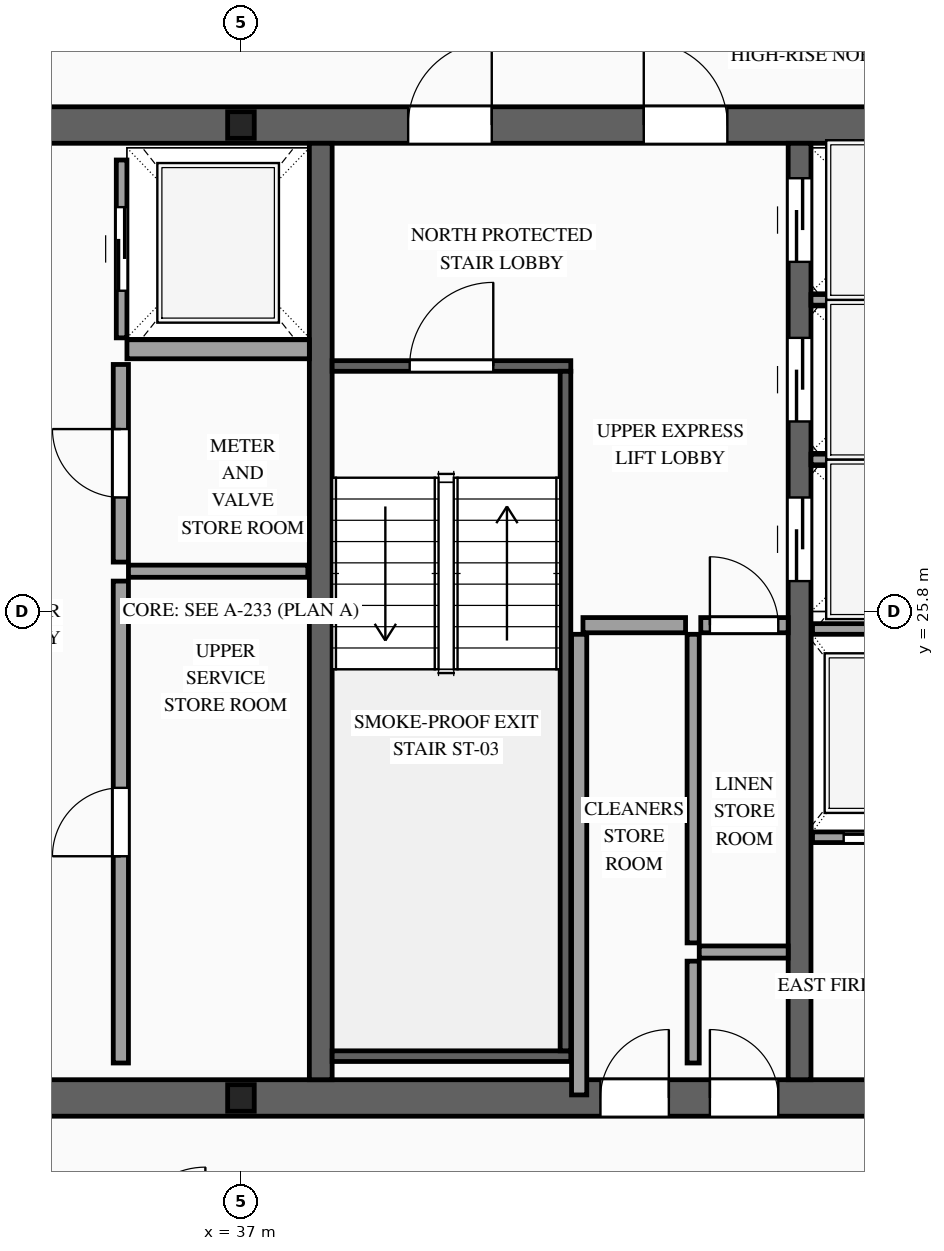
"""IFC4 building model, lengths in metres.
Left out: names, types, materials, properties, quantities, classifications, styles, units other than length and angle.
Written with IfcOpenShell. Run it as: python <this file> out.ifc"""

import sys

from ifc_helpers import new_model, si_unit, direction, frame, frame_2d, origin, origin_2d, place, context, subcontext, project, spatial, rectangle, i_section, extrude, source, transform, mapped, element, fill, save


model = new_model("IFC4")
c1 = context("Model", 3, precision=1e-05, world=origin(), true_north=direction((0.0, 1.0)))
c2 = subcontext(c1, "Body", "Model", "MODEL_VIEW")
j1 = project(units=[si_unit("LENGTHUNIT", "METRE"), si_unit("PLANEANGLEUNIT", "RADIAN")], contexts=[c1])
p1 = place(None, origin())
s1 = spatial("IfcSite", under=j1, at=p1, CompositionType="ELEMENT")
p2 = place(p1, origin())
s2 = spatial("IfcBuilding", under=s1, at=p2, CompositionType="ELEMENT")
p3 = place(p2, frame((0.0, 0.0, 311.2)))
s3 = spatial("IfcBuildingStorey", under=s2, at=p3, CompositionType="ELEMENT", Elevation=311.2)
p4 = place(p3, frame((23.56, 19.4, 0.0), z_axis=(0.0, 0.0, 1.0), x_axis=(1.0, 0.0, 0.0)))
e1 = element("IfcWall", 1, at=p4, inside=s3, PredefinedType="SHEAR", context=c2, shape_type="SweptSolid", body=[
    extrude(rectangle(XDim=26.88, YDim=0.48, at=frame_2d((13.44, 0.0))), origin(), (0.0, 0.0, 1.0), 3.5),
])
p5 = place(p4, frame((1.89, 0.0, 0.0)))
e2 = element("IfcOpeningElement", 2, at=p5, cuts=e1, PredefinedType="OPENING", context=c2, shape_type="SweptSolid", body=[
    extrude(rectangle(XDim=1.1, YDim=2.2, at=frame_2d((0.55, 1.1))), frame((0.0, 0.255, 0.0), z_axis=(0.0, -1.0, 0.0), x_axis=(1.0, 0.0, 0.0)), (0.0, 0.0, 1.0), 0.51),
])
p6 = place(p4, frame((9.79, 0.0, 0.0)))
e3 = element("IfcOpeningElement", 3, at=p6, cuts=e1, PredefinedType="OPENING", context=c2, shape_type="SweptSolid", body=[
    extrude(rectangle(XDim=1.1, YDim=2.2, at=frame_2d((0.55, 1.1))), frame((0.0, 0.255, 0.0), z_axis=(0.0, -1.0, 0.0), x_axis=(1.0, 0.0, 0.0)), (0.0, 0.0, 1.0), 0.51),
])
p7 = place(p4, frame((22.99, 0.0, 0.0)))
e4 = element("IfcOpeningElement", 4, at=p7, cuts=e1, PredefinedType="OPENING", context=c2, shape_type="SweptSolid", body=[
    extrude(rectangle(XDim=1.1, YDim=2.2, at=frame_2d((0.55, 1.1))), frame((0.0, 0.255, 0.0), z_axis=(0.0, -1.0, 0.0), x_axis=(1.0, 0.0, 0.0)), (0.0, 0.0, 1.0), 0.51),
])
p8 = place(p4, frame((19.61, 0.0, 0.0)))
e5 = element("IfcOpeningElement", 5, at=p8, cuts=e1, PredefinedType="OPENING", context=c2, shape_type="SweptSolid", body=[
    extrude(rectangle(XDim=0.9, YDim=2.15, at=frame_2d((0.45, 1.075))), frame((0.0, 0.255, 0.0), z_axis=(0.0, -1.0, 0.0), x_axis=(1.0, 0.0, 0.0)), (0.0, 0.0, 1.0), 0.51),
])
p9 = place(p4, frame((18.17, 0.0, 0.0)))
e6 = element("IfcOpeningElement", 6, at=p9, cuts=e1, PredefinedType="OPENING", context=c2, shape_type="SweptSolid", body=[
    extrude(rectangle(XDim=0.9, YDim=2.15, at=frame_2d((0.45, 1.075))), frame((0.0, 0.255, 0.0), z_axis=(0.0, -1.0, 0.0), x_axis=(1.0, 0.0, 0.0)), (0.0, 0.0, 1.0), 0.51),
])
p10 = place(p3, frame((23.56, 32.2, 0.0), z_axis=(0.0, 0.0, 1.0), x_axis=(1.0, 0.0, 0.0)))
e7 = element("IfcWall", 7, at=p10, inside=s3, PredefinedType="SHEAR", context=c2, shape_type="SweptSolid", body=[
    extrude(rectangle(XDim=26.88, YDim=0.48, at=frame_2d((13.44, 0.0))), origin(), (0.0, 0.0, 1.0), 3.5),
])
p11 = place(p10, frame((4.51, 0.0, 0.0)))
e8 = element("IfcOpeningElement", 8, at=p11, cuts=e7, PredefinedType="OPENING", context=c2, shape_type="SweptSolid", body=[
    extrude(rectangle(XDim=0.9, YDim=2.15, at=frame_2d((0.45, 1.075))), frame((0.0, 0.255, 0.0), z_axis=(0.0, -1.0, 0.0), x_axis=(1.0, 0.0, 0.0)), (0.0, 0.0, 1.0), 0.51),
])
p12 = place(p10, frame((9.79, 0.0, 0.0)))
e9 = element("IfcOpeningElement", 9, at=p12, cuts=e7, PredefinedType="OPENING", context=c2, shape_type="SweptSolid", body=[
    extrude(rectangle(XDim=1.1, YDim=2.2, at=frame_2d((0.55, 1.1))), frame((0.0, 0.255, 0.0), z_axis=(0.0, -1.0, 0.0), x_axis=(1.0, 0.0, 0.0)), (0.0, 0.0, 1.0), 0.51),
])
p13 = place(p10, frame((15.64, 0.0, 0.0)))
e10 = element("IfcOpeningElement", 10, at=p13, cuts=e7, PredefinedType="OPENING", context=c2, shape_type="SweptSolid", body=[
    extrude(rectangle(XDim=1.1, YDim=2.2, at=frame_2d((0.55, 1.1))), frame((0.0, 0.255, 0.0), z_axis=(0.0, -1.0, 0.0), x_axis=(1.0, 0.0, 0.0)), (0.0, 0.0, 1.0), 0.51),
])
p14 = place(p10, frame((18.74, 0.0, 0.0)))
e11 = element("IfcOpeningElement", 11, at=p14, cuts=e7, PredefinedType="OPENING", context=c2, shape_type="SweptSolid", body=[
    extrude(rectangle(XDim=1.1, YDim=2.2, at=frame_2d((0.55, 1.1))), frame((0.0, 0.255, 0.0), z_axis=(0.0, -1.0, 0.0), x_axis=(1.0, 0.0, 0.0)), (0.0, 0.0, 1.0), 0.51),
])
m1 = source(origin(), c2, "Body", "SweptSolid", [
    extrude(rectangle(XDim=12.32, YDim=0.3, at=frame_2d((6.16, 0.0))), origin(), (0.0, 0.0, 1.0), 3.5),
])
p15 = place(p3, frame((38.05, 19.64, 0.0), z_axis=(0.0, 0.0, 1.0), x_axis=(0.0, 1.0, 0.0)))
e12 = element("IfcWall", 12, at=p15, inside=s3, PredefinedType="SOLIDWALL", context=c2, shape_type="MappedRepresentation", body=[
    mapped(m1, transform((0.0, 0.0, 0.0), scale=1.0)),
])
p16 = place(p3, frame((44.35, 19.64, 0.0), z_axis=(0.0, 0.0, 1.0), x_axis=(0.0, 1.0, 0.0)))
e13 = element("IfcWall", 13, at=p16, inside=s3, PredefinedType="SOLIDWALL", context=c2, shape_type="SweptSolid", body=[
    extrude(rectangle(XDim=12.32, YDim=0.3, at=frame_2d((6.16, 0.0))), origin(), (0.0, 0.0, 1.0), 3.5),
])
p17 = place(p16, frame((6.56, 0.0, 0.0)))
e14 = element("IfcOpeningElement", 14, at=p17, cuts=e13, PredefinedType="OPENING", context=c2, shape_type="SweptSolid", body=[
    extrude(rectangle(XDim=1.1, YDim=2.2, at=frame_2d((0.55, 1.1))), frame((0.0, 0.165, 0.0), z_axis=(0.0, -1.0, 0.0), x_axis=(1.0, 0.0, 0.0)), (0.0, 0.0, 1.0), 0.33),
])
p18 = place(p16, frame((8.66, 0.0, 0.0)))
e15 = element("IfcOpeningElement", 15, at=p18, cuts=e13, PredefinedType="OPENING", context=c2, shape_type="SweptSolid", body=[
    extrude(rectangle(XDim=1.1, YDim=2.2, at=frame_2d((0.55, 1.1))), frame((0.0, 0.165, 0.0), z_axis=(0.0, -1.0, 0.0), x_axis=(1.0, 0.0, 0.0)), (0.0, 0.0, 1.0), 0.33),
])
p19 = place(p16, frame((10.76, 0.0, 0.0)))
e16 = element("IfcOpeningElement", 16, at=p19, cuts=e13, PredefinedType="OPENING", context=c2, shape_type="SweptSolid", body=[
    extrude(rectangle(XDim=1.1, YDim=2.2, at=frame_2d((0.55, 1.1))), frame((0.0, 0.165, 0.0), z_axis=(0.0, -1.0, 0.0), x_axis=(1.0, 0.0, 0.0)), (0.0, 0.0, 1.0), 0.33),
])
m2 = source(origin(), c2, "Body", "SweptSolid", [
    extrude(i_section(OverallWidth=0.35, OverallDepth=0.35, WebThickness=0.012, FlangeThickness=0.019, at=origin_2d()), origin(), (0.0, 0.0, 1.0), 3.5),
])
for number, where, z_axis, x_axis in (
    (17, (37.0, 19.4, 0.0), (0.0, 0.0, 1.0), (1.0, 0.0, 0.0)),
    (18, (37.0, 32.2, 0.0), (0.0, 0.0, 1.0), (1.0, 0.0, 0.0)),
):
    element("IfcColumn", number, at=place(p3, frame(where, z_axis=z_axis, x_axis=x_axis)), inside=s3, PredefinedType="COLUMN", context=c2, shape_type="MappedRepresentation", body=[
        mapped(m2, transform((0.0, 0.0, 0.0), scale=1.0)),
    ])
p20 = place(p3, frame((44.52, 22.83, 0.0), z_axis=(0.0, 0.0, 1.0), x_axis=(1.0, 0.0, 0.0)))
e19 = element("IfcWall", 19, at=p20, inside=s3, PredefinedType="SOLIDWALL", context=c2, shape_type="SweptSolid", body=[
    extrude(rectangle(XDim=1.92, YDim=0.14, at=frame_2d((0.96, 0.0))), origin(), (0.0, 0.0, 1.0), 3.28),
])
p21 = place(p20, frame((0.41, 0.0, 0.0)))
e20 = element("IfcOpeningElement", 20, at=p21, cuts=e19, PredefinedType="OPENING", context=c2, shape_type="SweptSolid", body=[
    extrude(rectangle(XDim=1.1, YDim=2.2, at=frame_2d((0.55, 1.1))), frame((0.0, 0.085, 0.0), z_axis=(0.0, -1.0, 0.0), x_axis=(1.0, 0.0, 0.0)), (0.0, 0.0, 1.0), 0.17),
])
m3 = source(origin(), c2, "Body", "SweptSolid", [
    extrude(rectangle(XDim=1.92, YDim=0.14, at=frame_2d((0.96, 0.0))), origin(), (0.0, 0.0, 1.0), 3.28),
])
p22 = place(p3, frame((44.52, 25.57, 0.0), z_axis=(0.0, 0.0, 1.0), x_axis=(1.0, 0.0, 0.0)))
e21 = element("IfcWall", 21, at=p22, inside=s3, PredefinedType="SOLIDWALL", context=c2, shape_type="MappedRepresentation", body=[
    mapped(m3, transform((0.0, 0.0, 0.0), scale=1.0)),
])
p23 = place(p3, frame((35.43, 29.4, 0.0), z_axis=(0.0, 0.0, 1.0), x_axis=(0.0, 1.0, 0.0)))
e22 = element("IfcWall", 22, at=p23, inside=s3, PredefinedType="SOLIDWALL", context=c2, shape_type="SweptSolid", body=[
    extrude(rectangle(XDim=2.34, YDim=0.14, at=frame_2d((1.17, 0.0))), origin(), (0.0, 0.0, 1.0), 3.28),
])
p24 = place(p23, frame((0.62, 0.0, 0.0)))
e23 = element("IfcOpeningElement", 23, at=p24, cuts=e22, PredefinedType="OPENING", context=c2, shape_type="SweptSolid", body=[
    extrude(rectangle(XDim=1.1, YDim=2.2, at=frame_2d((0.55, 1.1))), frame((0.0, 0.085, 0.0), z_axis=(0.0, -1.0, 0.0), x_axis=(1.0, 0.0, 0.0)), (0.0, 0.0, 1.0), 0.17),
])
m4 = source(origin(), c2, "Body", "SweptSolid", [
    extrude(rectangle(XDim=2.4, YDim=0.25, at=frame_2d((1.2, 0.0))), origin(), (0.0, 0.0, 1.0), 3.28),
])
p25 = place(p3, frame((35.5, 29.25, 0.0), z_axis=(0.0, 0.0, 1.0), x_axis=(1.0, 0.0, 0.0)))
e24 = element("IfcWall", 24, at=p25, inside=s3, PredefinedType="SOLIDWALL", context=c2, shape_type="MappedRepresentation", body=[
    mapped(m4, transform((0.0, 0.0, 0.0), scale=1.0)),
])
m5 = source(origin(), c2, "Body", "SweptSolid", [
    extrude(rectangle(XDim=2.0, YDim=0.14, at=frame_2d((1.0, 0.0))), origin(), (0.0, 0.0, 1.0), 3.28),
])
for number, where, z_axis, x_axis in (
    (25, (44.5, 27.8, 0.0), (0.0, 0.0, 1.0), (1.0, 0.0, 0.0)),
    (26, (44.5, 29.9, 0.0), (0.0, 0.0, 1.0), (1.0, 0.0, 0.0)),
):
    element("IfcWall", number, at=place(p3, frame(where, z_axis=z_axis, x_axis=x_axis)), inside=s3, PredefinedType="SOLIDWALL", context=c2, shape_type="MappedRepresentation", body=[
        mapped(m5, transform((0.0, 0.0, 0.0), scale=1.0)),
    ])
p26 = place(p3, frame((38.2, 29.03, 0.0), z_axis=(0.0, 0.0, 1.0), x_axis=(1.0, 0.0, 0.0)))
e27 = element("IfcWall", 27, at=p26, inside=s3, PredefinedType="SOLIDWALL", context=c2, shape_type="SweptSolid", body=[
    extrude(rectangle(XDim=3.14, YDim=0.14, at=frame_2d((1.57, 0.0))), origin(), (0.0, 0.0, 1.0), 3.28),
])
p27 = place(p26, frame((1.02, 0.0, 0.0)))
e28 = element("IfcOpeningElement", 28, at=p27, cuts=e27, PredefinedType="OPENING", context=c2, shape_type="SweptSolid", body=[
    extrude(rectangle(XDim=1.1, YDim=2.2, at=frame_2d((0.55, 1.1))), frame((0.0, 0.085, 0.0), z_axis=(0.0, -1.0, 0.0), x_axis=(1.0, 0.0, 0.0)), (0.0, 0.0, 1.0), 0.17),
])
m6 = source(origin(), c2, "Body", "SweptSolid", [
    extrude(rectangle(XDim=3.14, YDim=0.14, at=frame_2d((1.57, 0.0))), origin(), (0.0, 0.0, 1.0), 3.28),
])
p28 = place(p3, frame((38.2, 19.95, 0.0), z_axis=(0.0, 0.0, 1.0), x_axis=(1.0, 0.0, 0.0)))
e29 = element("IfcWall", 29, at=p28, inside=s3, PredefinedType="SOLIDWALL", context=c2, shape_type="MappedRepresentation", body=[
    mapped(m6, transform((0.0, 0.0, 0.0), scale=1.0)),
])
m7 = source(origin(), c2, "Body", "SweptSolid", [
    extrude(rectangle(XDim=8.94, YDim=0.14, at=frame_2d((4.47, 0.0))), origin(), (0.0, 0.0, 1.0), 3.28),
])
p29 = place(p3, frame((41.27, 20.02, 0.0), z_axis=(0.0, 0.0, 1.0), x_axis=(0.0, 1.0, 0.0)))
e30 = element("IfcWall", 30, at=p29, inside=s3, PredefinedType="SOLIDWALL", context=c2, shape_type="MappedRepresentation", body=[
    mapped(m7, transform((0.0, 0.0, 0.0), scale=1.0)),
])
p30 = place(p3, frame((35.42, 19.86, 0.0), z_axis=(0.0, 0.0, 1.0), x_axis=(0.0, 1.0, 0.0)))
e31 = element("IfcWall", 31, at=p30, inside=s3, PredefinedType="PARTITIONING", context=c2, shape_type="SweptSolid", body=[
    extrude(rectangle(XDim=6.34, YDim=0.2, at=frame_2d((3.17, 0.0))), origin(), (0.0, 0.0, 1.0), 3.28),
])
p31 = place(p30, frame((2.72, 0.0, 0.0)))
e32 = element("IfcOpeningElement", 32, at=p31, cuts=e31, PredefinedType="OPENING", context=c2, shape_type="SweptSolid", body=[
    extrude(rectangle(XDim=0.9, YDim=2.15, at=frame_2d((0.45, 1.075))), frame((0.0, 0.115, 0.0), z_axis=(0.0, -1.0, 0.0), x_axis=(1.0, 0.0, 0.0)), (0.0, 0.0, 1.0), 0.23),
])
p32 = place(p3, frame((35.42, 26.45, 0.0), z_axis=(0.0, 0.0, 1.0), x_axis=(0.0, 1.0, 0.0)))
e33 = element("IfcWall", 33, at=p32, inside=s3, PredefinedType="PARTITIONING", context=c2, shape_type="SweptSolid", body=[
    extrude(rectangle(XDim=2.6, YDim=0.2, at=frame_2d((1.3, 0.0))), origin(), (0.0, 0.0, 1.0), 3.28),
])
p33 = place(p32, frame((0.85, 0.0, 0.0)))
e34 = element("IfcOpeningElement", 34, at=p33, cuts=e33, PredefinedType="OPENING", context=c2, shape_type="SweptSolid", body=[
    extrude(rectangle(XDim=0.9, YDim=2.15, at=frame_2d((0.45, 1.075))), frame((0.0, 0.115, 0.0), z_axis=(0.0, -1.0, 0.0), x_axis=(1.0, 0.0, 0.0)), (0.0, 0.0, 1.0), 0.23),
])
m8 = source(origin(), c2, "Body", "SweptSolid", [
    extrude(rectangle(XDim=2.36, YDim=0.16, at=frame_2d((1.18, 0.0))), origin(), (0.0, 0.0, 1.0), 3.28),
])
p34 = place(p3, frame((35.52, 26.33, 0.0), z_axis=(0.0, 0.0, 1.0), x_axis=(1.0, 0.0, 0.0)))
e35 = element("IfcWall", 35, at=p34, inside=s3, PredefinedType="PARTITIONING", context=c2, shape_type="MappedRepresentation", body=[
    mapped(m8, transform((0.0, 0.0, 0.0), scale=1.0)),
])
m9 = source(origin(), c2, "Body", "SweptSolid", [
    extrude(rectangle(XDim=1.34, YDim=0.16, at=frame_2d((0.67, 0.0))), origin(), (0.0, 0.0, 1.0), 3.28),
])
p35 = place(p3, frame((42.95, 19.86, 0.0), z_axis=(0.0, 0.0, 1.0), x_axis=(0.0, 1.0, 0.0)))
e36 = element("IfcWall", 36, at=p35, inside=s3, PredefinedType="PARTITIONING", context=c2, shape_type="MappedRepresentation", body=[
    mapped(m9, transform((0.0, 0.0, 0.0), scale=1.0)),
])
m10 = source(origin(), c2, "Body", "SweptSolid", [
    extrude(rectangle(XDim=1.17, YDim=0.16, at=frame_2d((0.585, 0.0))), origin(), (0.0, 0.0, 1.0), 3.28),
])
p36 = place(p3, frame((43.03, 21.32, 0.0), z_axis=(0.0, 0.0, 1.0), x_axis=(1.0, 0.0, 0.0)))
e37 = element("IfcWall", 37, at=p36, inside=s3, PredefinedType="PARTITIONING", context=c2, shape_type="MappedRepresentation", body=[
    mapped(m10, transform((0.0, 0.0, 0.0), scale=1.0)),
])
m11 = source(origin(), c2, "Body", "SweptSolid", [
    extrude(rectangle(XDim=6.06, YDim=0.2, at=frame_2d((3.03, 0.0))), origin(), (0.0, 0.0, 1.0), 3.28),
])
p37 = place(p3, frame((41.45, 19.44, 0.0), z_axis=(0.0, 0.0, 1.0), x_axis=(0.0, 1.0, 0.0)))
e38 = element("IfcWall", 38, at=p37, inside=s3, PredefinedType="PARTITIONING", context=c2, shape_type="MappedRepresentation", body=[
    mapped(m11, transform((0.0, 0.0, 0.0), scale=1.0)),
])
m12 = source(origin(), c2, "Body", "SweptSolid", [
    extrude(rectangle(XDim=1.35, YDim=0.2, at=frame_2d((0.675, 0.0))), origin(), (0.0, 0.0, 1.0), 3.28),
])
p38 = place(p3, frame((41.5, 25.62, 0.0), z_axis=(0.0, 0.0, 1.0), x_axis=(1.0, 0.0, 0.0)))
e39 = element("IfcWall", 39, at=p38, inside=s3, PredefinedType="PARTITIONING", context=c2, shape_type="MappedRepresentation", body=[
    mapped(m12, transform((0.0, 0.0, 0.0), scale=1.0)),
])
m13 = source(origin(), c2, "Body", "SweptSolid", [
    extrude(rectangle(XDim=4.06, YDim=0.16, at=frame_2d((2.03, 0.0))), origin(), (0.0, 0.0, 1.0), 3.28),
])
p39 = place(p3, frame((42.95, 21.44, 0.0), z_axis=(0.0, 0.0, 1.0), x_axis=(0.0, 1.0, 0.0)))
e40 = element("IfcWall", 40, at=p39, inside=s3, PredefinedType="PARTITIONING", context=c2, shape_type="MappedRepresentation", body=[
    mapped(m13, transform((0.0, 0.0, 0.0), scale=1.0)),
])
p40 = place(p3, frame((43.05, 25.62, 0.0), z_axis=(0.0, 0.0, 1.0), x_axis=(1.0, 0.0, 0.0)))
e41 = element("IfcWall", 41, at=p40, inside=s3, PredefinedType="PARTITIONING", context=c2, shape_type="SweptSolid", body=[
    extrude(rectangle(XDim=1.15, YDim=0.2, at=frame_2d((0.575, 0.0))), origin(), (0.0, 0.0, 1.0), 3.28),
])
p41 = place(p40, frame((0.12, 0.0, 0.0)))
e42 = element("IfcOpeningElement", 42, at=p41, cuts=e41, PredefinedType="OPENING", context=c2, shape_type="SweptSolid", body=[
    extrude(rectangle(XDim=0.9, YDim=2.15, at=frame_2d((0.45, 1.075))), frame((0.0, 0.115, 0.0), z_axis=(0.0, -1.0, 0.0), x_axis=(1.0, 0.0, 0.0)), (0.0, 0.0, 1.0), 0.23),
])
m14 = source(origin(), c2, "Body", "SweptSolid", [
    extrude(rectangle(XDim=1.1, YDim=2.2, at=frame_2d((0.55, 1.1))), frame((0.0, 0.025, 0.0), z_axis=(0.0, -1.0, 0.0), x_axis=(1.0, 0.0, 0.0)), (0.0, 0.0, 1.0), 0.05),
])
p42 = place(p21, origin())
e43 = element("IfcDoor", 43, at=p42, inside=s3, OperationType="SLIDING_TO_RIGHT", PredefinedType="DOOR", context=c2, shape_type="MappedRepresentation", body=[
    mapped(m14, transform((0.0, 0.0, 0.0), scale=1.0)),
])
fill(e20, e43)
p43 = place(p24, origin())
e44 = element("IfcDoor", 44, at=p43, inside=s3, OperationType="SLIDING_TO_RIGHT", PredefinedType="DOOR", context=c2, shape_type="MappedRepresentation", body=[
    mapped(m14, transform((0.0, 0.0, 0.0), scale=1.0)),
])
fill(e23, e44)
p44 = place(p17, origin())
e45 = element("IfcDoor", 45, at=p44, inside=s3, OperationType="SLIDING_TO_LEFT", PredefinedType="DOOR", context=c2, shape_type="MappedRepresentation", body=[
    mapped(m14, transform((0.0, 0.0, 0.0), scale=1.0)),
])
fill(e14, e45)
p45 = place(p18, origin())
e46 = element("IfcDoor", 46, at=p45, inside=s3, OperationType="SLIDING_TO_RIGHT", PredefinedType="DOOR", context=c2, shape_type="MappedRepresentation", body=[
    mapped(m14, transform((0.0, 0.0, 0.0), scale=1.0)),
])
fill(e15, e46)
p46 = place(p19, origin())
e47 = element("IfcDoor", 47, at=p46, inside=s3, OperationType="SLIDING_TO_LEFT", PredefinedType="DOOR", context=c2, shape_type="MappedRepresentation", body=[
    mapped(m14, transform((0.0, 0.0, 0.0), scale=1.0)),
])
fill(e16, e47)
m15 = source(origin(), c2, "Body", "SweptSolid", [
    extrude(rectangle(XDim=1.1, YDim=2.2, at=frame_2d((0.55, 1.1))), frame((0.0, 0.025, 0.0), z_axis=(0.0, -1.0, 0.0), x_axis=(1.0, 0.0, 0.0)), (0.0, 0.0, 1.0), 0.05),
])
p47 = place(p27, origin())
e48 = element("IfcDoor", 48, at=p47, inside=s3, OperationType="SINGLE_SWING_RIGHT", PredefinedType="DOOR", context=c2, shape_type="MappedRepresentation", body=[
    mapped(m15, transform((0.0, 0.0, 0.0), scale=1.0)),
])
fill(e28, e48)
p48 = place(p13, origin())
e49 = element("IfcDoor", 49, at=p48, inside=s3, OperationType="SINGLE_SWING_RIGHT", PredefinedType="DOOR", context=c2, shape_type="MappedRepresentation", body=[
    mapped(m15, transform((0.0, 0.0, 0.0), scale=1.0)),
])
fill(e10, e49)
p49 = place(p14, origin())
e50 = element("IfcDoor", 50, at=p49, inside=s3, OperationType="SINGLE_SWING_LEFT", PredefinedType="DOOR", context=c2, shape_type="MappedRepresentation", body=[
    mapped(m15, transform((0.0, 0.0, 0.0), scale=1.0)),
])
fill(e11, e50)
m16 = source(origin(), c2, "Body", "SweptSolid", [
    extrude(rectangle(XDim=0.9, YDim=2.15, at=frame_2d((0.45, 1.075))), frame((0.0, 0.025, 0.0), z_axis=(0.0, -1.0, 0.0), x_axis=(1.0, 0.0, 0.0)), (0.0, 0.0, 1.0), 0.05),
])
p50 = place(p31, origin())
e51 = element("IfcDoor", 51, at=p50, inside=s3, OperationType="SINGLE_SWING_LEFT", PredefinedType="DOOR", context=c2, shape_type="MappedRepresentation", body=[
    mapped(m16, transform((0.0, 0.0, 0.0), scale=1.0)),
])
fill(e32, e51)
p51 = place(p33, origin())
e52 = element("IfcDoor", 52, at=p51, inside=s3, OperationType="SINGLE_SWING_RIGHT", PredefinedType="DOOR", context=c2, shape_type="MappedRepresentation", body=[
    mapped(m16, transform((0.0, 0.0, 0.0), scale=1.0)),
])
fill(e34, e52)
p52 = place(p8, origin())
e53 = element("IfcDoor", 53, at=p52, inside=s3, OperationType="SINGLE_SWING_LEFT", PredefinedType="DOOR", context=c2, shape_type="MappedRepresentation", body=[
    mapped(m16, transform((0.0, 0.0, 0.0), scale=1.0)),
])
fill(e5, e53)
p53 = place(p9, origin())
e54 = element("IfcDoor", 54, at=p53, inside=s3, OperationType="SINGLE_SWING_RIGHT", PredefinedType="DOOR", context=c2, shape_type="MappedRepresentation", body=[
    mapped(m16, transform((0.0, 0.0, 0.0), scale=1.0)),
])
fill(e6, e54)
p54 = place(p41, origin())
e55 = element("IfcDoor", 55, at=p54, inside=s3, OperationType="SINGLE_SWING_LEFT", PredefinedType="DOOR", context=c2, shape_type="MappedRepresentation", body=[
    mapped(m16, transform((0.0, 0.0, 0.0), scale=1.0)),
])
fill(e42, e55)
save(model, sys.argv[1])
